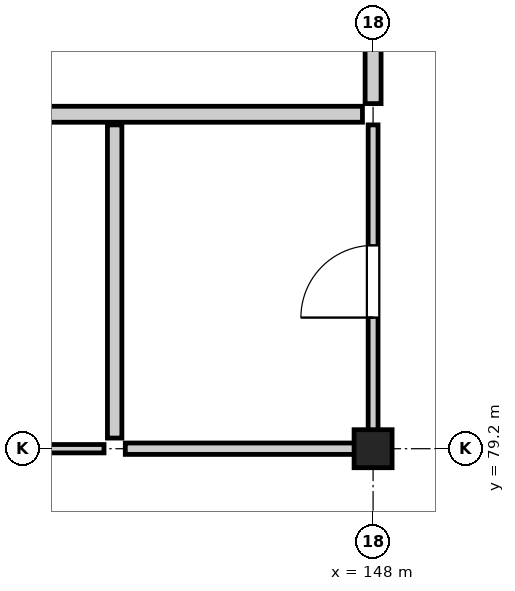
"""IFC4 building model, lengths in metres.
Left out: names, types, materials, properties, quantities, classifications, styles, units other than length and angle.
Written with IfcOpenShell. Run it as: python <this file> out.ifc"""

import sys

from ifc_helpers import new_model, si_unit, direction, frame, frame_2d, origin, origin_2d, place, context, subcontext, project, spatial, rectangle, extrude, element, fill, save


model = new_model("IFC4")
c1 = context("Model", 3, precision=1e-05, world=origin(), true_north=direction((0.0, 1.0)))
c2 = subcontext(c1, "Body", "Model", "MODEL_VIEW")
j1 = project(units=[si_unit("LENGTHUNIT", "METRE"), si_unit("PLANEANGLEUNIT", "RADIAN")], contexts=[c1])
p1 = place(None, origin())
s1 = spatial("IfcSite", under=j1, at=p1, CompositionType="ELEMENT")
p2 = place(p1, origin())
s2 = spatial("IfcBuilding", under=s1, at=p2, CompositionType="ELEMENT")
p3 = place(p2, frame((0.0, 0.0, 62.65)))
s3 = spatial("IfcBuildingStorey", under=s2, at=p3, CompositionType="ELEMENT", Elevation=62.65)
p4 = place(p3, frame((148.0, 79.2, 0.0), z_axis=(0.0, 0.0, 1.0), x_axis=(1.0, 0.0, 0.0)))
e1 = element("IfcColumn", 1, at=p4, inside=s3, PredefinedType="COLUMN", context=c2, shape_type="SweptSolid", body=[
    extrude(rectangle(XDim=0.5, YDim=0.5, at=origin_2d()), origin(), (0.0, 0.0, 1.0), 3.95),
])
p5 = place(p3, frame((140.14, 83.6, 0.0), z_axis=(0.0, 0.0, 1.0), x_axis=(1.0, 0.0, 0.0)))
e2 = element("IfcWall", 2, at=p5, inside=s3, PredefinedType="SOLIDWALL", context=c2, shape_type="SweptSolid", body=[
    extrude(rectangle(XDim=7.72, YDim=0.21, at=frame_2d((3.86, 0.0))), origin(), (0.0, 0.0, 1.0), 3.67),
])
p6 = place(p3, frame((148.0, 83.74, 0.0), z_axis=(0.0, 0.0, 1.0), x_axis=(0.0, 1.0, 0.0)))
e3 = element("IfcWall", 3, at=p6, inside=s3, PredefinedType="SOLIDWALL", context=c2, shape_type="SweptSolid", body=[
    extrude(rectangle(XDim=3.32, YDim=0.21, at=frame_2d((1.66, 0.0))), origin(), (0.0, 0.0, 1.0), 2.945),
])
p7 = place(p6, frame((1.16, 0.0, 0.0)))
e4 = element("IfcOpeningElement", 4, at=p7, cuts=e3, PredefinedType="OPENING", context=c2, shape_type="SweptSolid", body=[
    extrude(rectangle(XDim=1.0, YDim=2.15, at=frame_2d((0.5, 1.075))), frame((0.0, 0.117, 0.0), z_axis=(0.0, -1.0, 0.0), x_axis=(1.0, 0.0, 0.0)), (0.0, 0.0, 1.0), 0.234),
])
p8 = place(p3, frame((140.14, 79.2, 0.0), z_axis=(0.0, 0.0, 1.0), x_axis=(1.0, 0.0, 0.0)))
e5 = element("IfcWall", 5, at=p8, inside=s3, PredefinedType="PARTITIONING", context=c2, shape_type="SweptSolid", body=[
    extrude(rectangle(XDim=4.32, YDim=0.11, at=frame_2d((2.16, 0.0))), origin(), (0.0, 0.0, 1.0), 3.045),
])
p9 = place(p8, frame((1.66, 0.0, 0.0)))
e6 = element("IfcOpeningElement", 6, at=p9, cuts=e5, PredefinedType="OPENING", context=c2, shape_type="SweptSolid", body=[
    extrude(rectangle(XDim=1.0, YDim=2.15, at=frame_2d((0.5, 1.075))), frame((0.0, 0.067, 0.0), z_axis=(0.0, -1.0, 0.0), x_axis=(1.0, 0.0, 0.0)), (0.0, 0.0, 1.0), 0.134),
])
p10 = place(p3, frame((144.6, 79.34, 0.0), z_axis=(0.0, 0.0, 1.0), x_axis=(0.0, 1.0, 0.0)))
e7 = element("IfcWall", 7, at=p10, inside=s3, PredefinedType="PARTITIONING", context=c2, shape_type="SweptSolid", body=[
    extrude(rectangle(XDim=4.12, YDim=0.19, at=frame_2d((2.06, 0.0))), origin(), (0.0, 0.0, 1.0), 3.67),
])
p11 = place(p3, frame((144.74, 79.2, 0.0), z_axis=(0.0, 0.0, 1.0), x_axis=(1.0, 0.0, 0.0)))
e8 = element("IfcWall", 8, at=p11, inside=s3, PredefinedType="PARTITIONING", context=c2, shape_type="SweptSolid", body=[
    extrude(rectangle(XDim=3.12, YDim=0.15, at=frame_2d((1.56, 0.0))), origin(), (0.0, 0.0, 1.0), 3.045),
])
p12 = place(p3, frame((148.0, 79.34, 0.0), z_axis=(0.0, 0.0, 1.0), x_axis=(0.0, 1.0, 0.0)))
e9 = element("IfcWall", 9, at=p12, inside=s3, PredefinedType="PARTITIONING", context=c2, shape_type="SweptSolid", body=[
    extrude(rectangle(XDim=4.12, YDim=0.13, at=frame_2d((2.06, 0.0))), origin(), (0.0, 0.0, 1.0), 2.945),
])
p13 = place(p12, frame((1.585, 0.0, 0.0)))
e10 = element("IfcOpeningElement", 10, at=p13, cuts=e9, PredefinedType="OPENING", context=c2, shape_type="SweptSolid", body=[
    extrude(rectangle(XDim=0.95, YDim=2.15, at=frame_2d((0.475, 1.075))), frame((0.0, 0.077, 0.0), z_axis=(0.0, -1.0, 0.0), x_axis=(1.0, 0.0, 0.0)), (0.0, 0.0, 1.0), 0.154),
])
p14 = place(p13, origin())
e11 = element("IfcDoor", 11, at=p14, inside=s3, OperationType="SINGLE_SWING_LEFT", PredefinedType="DOOR", context=c2, shape_type="SweptSolid", body=[
    extrude(rectangle(XDim=0.95, YDim=2.15, at=frame_2d((0.475, 1.075))), frame((0.0, 0.025, 0.0), z_axis=(0.0, -1.0, 0.0), x_axis=(1.0, 0.0, 0.0)), (0.0, 0.0, 1.0), 0.05),
])
fill(e10, e11)
save(model, sys.argv[1])
